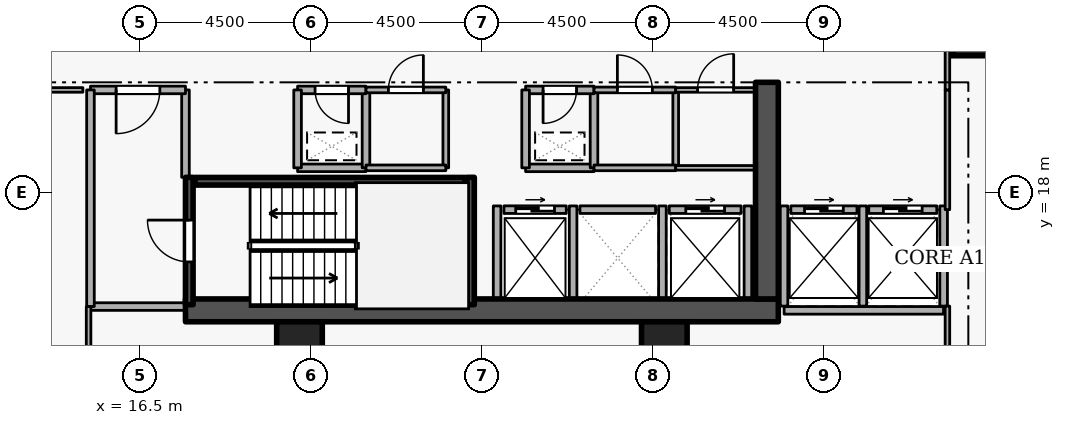
"""IFC4 building model, lengths in metres.
Left out: names, types, materials, properties, quantities, classifications, styles, units other than length and angle.
Written with IfcOpenShell. Run it as: python <this file> out.ifc"""

import sys

from ifc_helpers import new_model, si_unit, direction, frame, frame_2d, origin, origin_2d, place, context, subcontext, project, spatial, rectangle, extrude, element, fill, save


model = new_model("IFC4")
c1 = context("Model", 3, precision=1e-05, world=origin(), true_north=direction((0.0, 1.0)))
c2 = subcontext(c1, "Body", "Model", "MODEL_VIEW")
j1 = project(units=[si_unit("LENGTHUNIT", "METRE"), si_unit("PLANEANGLEUNIT", "RADIAN")], contexts=[c1])
p1 = place(None, origin())
s1 = spatial("IfcSite", under=j1, at=p1, CompositionType="ELEMENT")
p2 = place(p1, origin())
s2 = spatial("IfcBuilding", under=s1, at=p2, CompositionType="ELEMENT")
p3 = place(p2, frame((0.0, 0.0, 112.5)))
s3 = spatial("IfcBuildingStorey", under=s2, at=p3, CompositionType="ELEMENT", Elevation=112.5)
p4 = place(p3, frame((17.7, 14.9, 0.0), z_axis=(0.0, 0.0, 1.0), x_axis=(1.0, 0.0, 0.0)))
e1 = element("IfcWall", 1, at=p4, inside=s3, PredefinedType="SHEAR", context=c2, shape_type="SweptSolid", body=[
    extrude(rectangle(XDim=15.6, YDim=0.6, at=frame_2d((7.8, 0.0))), origin(), (0.0, 0.0, 1.0), 3.6),
])
p5 = place(p3, frame((33.0, 15.2, 0.0), z_axis=(0.0, 0.0, 1.0), x_axis=(0.0, 1.0, 0.0)))
e2 = element("IfcWall", 2, at=p5, inside=s3, PredefinedType="SHEAR", context=c2, shape_type="SweptSolid", body=[
    extrude(rectangle(XDim=5.7, YDim=0.6, at=frame_2d((2.85, 0.0))), origin(), (0.0, 0.0, 1.0), 3.6),
])
for number, where, z_axis, x_axis in (
    (3, (38.5, 22.2, 0.0), (0.0, 0.0, 1.0), (1.0, 0.0, 0.0)),
    (4, (20.7, 14.0, 0.0), (0.0, 0.0, 1.0), (1.0, 0.0, 0.0)),
    (5, (30.3, 14.0, 0.0), (0.0, 0.0, 1.0), (1.0, 0.0, 0.0)),
):
    element("IfcColumn", number, at=place(p3, frame(where, z_axis=z_axis, x_axis=x_axis)), inside=s3, PredefinedType="COLUMN", context=c2, shape_type="SweptSolid", body=[
        extrude(rectangle(XDim=1.2, YDim=1.2, at=origin_2d()), origin(), (0.0, 0.0, 1.0), 3.6),
    ])
p6 = place(p3, frame((26.08, 17.55, 0.0), z_axis=(0.0, 0.0, 1.0), x_axis=(1.0, 0.0, 0.0)))
e6 = element("IfcWall", 6, at=p6, inside=s3, PredefinedType="STANDARD", context=c2, shape_type="SweptSolid", body=[
    extrude(rectangle(XDim=1.64, YDim=0.2, at=frame_2d((0.82, 0.0))), origin(), (0.0, 0.0, 1.0), 3.34),
])
p7 = place(p6, frame((0.31, 0.0, 0.0)))
e7 = element("IfcOpeningElement", 7, at=p7, cuts=e6, PredefinedType="OPENING", context=c2, shape_type="SweptSolid", body=[
    extrude(rectangle(XDim=1.02, YDim=2.06, at=frame_2d((0.51, 1.03))), frame((0.0, 0.11, 0.0), z_axis=(0.0, -1.0, 0.0), x_axis=(1.0, 0.0, 0.0)), (0.0, 0.0, 1.0), 0.22),
])
p8 = place(p3, frame((28.08, 17.55, 0.0), z_axis=(0.0, 0.0, 1.0), x_axis=(1.0, 0.0, 0.0)))
e8 = element("IfcWall", 8, at=p8, inside=s3, PredefinedType="STANDARD", context=c2, shape_type="SweptSolid", body=[
    extrude(rectangle(XDim=1.99, YDim=0.2, at=frame_2d((0.995, 0.0))), origin(), (0.0, 0.0, 1.0), 3.34),
])
p9 = place(p3, frame((30.43, 17.55, 0.0), z_axis=(0.0, 0.0, 1.0), x_axis=(1.0, 0.0, 0.0)))
e9 = element("IfcWall", 9, at=p9, inside=s3, PredefinedType="STANDARD", context=c2, shape_type="SweptSolid", body=[
    extrude(rectangle(XDim=1.89, YDim=0.2, at=frame_2d((0.945, 0.0))), origin(), (0.0, 0.0, 1.0), 3.34),
])
p10 = place(p9, frame((0.435, 0.0, 0.0)))
e10 = element("IfcOpeningElement", 10, at=p10, cuts=e9, PredefinedType="OPENING", context=c2, shape_type="SweptSolid", body=[
    extrude(rectangle(XDim=1.02, YDim=2.06, at=frame_2d((0.51, 1.03))), frame((0.0, 0.11, 0.0), z_axis=(0.0, -1.0, 0.0), x_axis=(1.0, 0.0, 0.0)), (0.0, 0.0, 1.0), 0.22),
])
p11 = place(p3, frame((33.63, 17.55, 0.0), z_axis=(0.0, 0.0, 1.0), x_axis=(1.0, 0.0, 0.0)))
e11 = element("IfcWall", 11, at=p11, inside=s3, PredefinedType="STANDARD", context=c2, shape_type="SweptSolid", body=[
    extrude(rectangle(XDim=1.74, YDim=0.2, at=frame_2d((0.87, 0.0))), origin(), (0.0, 0.0, 1.0), 3.34),
])
p12 = place(p11, frame((0.36, 0.0, 0.0)))
e12 = element("IfcOpeningElement", 12, at=p12, cuts=e11, PredefinedType="OPENING", context=c2, shape_type="SweptSolid", body=[
    extrude(rectangle(XDim=1.02, YDim=2.06, at=frame_2d((0.51, 1.03))), frame((0.0, 0.11, 0.0), z_axis=(0.0, -1.0, 0.0), x_axis=(1.0, 0.0, 0.0)), (0.0, 0.0, 1.0), 0.22),
])
p13 = place(p3, frame((35.68, 17.55, 0.0), z_axis=(0.0, 0.0, 1.0), x_axis=(1.0, 0.0, 0.0)))
e13 = element("IfcWall", 13, at=p13, inside=s3, PredefinedType="STANDARD", context=c2, shape_type="SweptSolid", body=[
    extrude(rectangle(XDim=1.79, YDim=0.2, at=frame_2d((0.895, 0.0))), origin(), (0.0, 0.0, 1.0), 3.34),
])
p14 = place(p13, frame((0.385, 0.0, 0.0)))
e14 = element("IfcOpeningElement", 14, at=p14, cuts=e13, PredefinedType="OPENING", context=c2, shape_type="SweptSolid", body=[
    extrude(rectangle(XDim=1.02, YDim=2.06, at=frame_2d((0.51, 1.03))), frame((0.0, 0.11, 0.0), z_axis=(0.0, -1.0, 0.0), x_axis=(1.0, 0.0, 0.0)), (0.0, 0.0, 1.0), 0.22),
])
for number, where, z_axis, x_axis in (
    (15, (27.9, 15.212, 0.0), (0.0, 0.0, 1.0), (0.0, 1.0, 0.0)),
    (16, (25.9, 15.212, 0.0), (0.0, 0.0, 1.0), (0.0, 1.0, 0.0)),
    (17, (30.25, 15.212, 0.0), (0.0, 0.0, 1.0), (0.0, 1.0, 0.0)),
    (18, (32.5, 15.212, 0.0), (0.0, 0.0, 1.0), (0.0, 1.0, 0.0)),
):
    element("IfcWall", number, at=place(p3, frame(where, z_axis=z_axis, x_axis=x_axis)), inside=s3, PredefinedType="STANDARD", context=c2, shape_type="SweptSolid", body=[
        extrude(rectangle(XDim=2.436, YDim=0.2, at=frame_2d((1.218, 0.0))), origin(), (0.0, 0.0, 1.0), 3.34),
    ])
p15 = place(p3, frame((33.452, 14.9, 0.0), z_axis=(0.0, 0.0, 1.0), x_axis=(1.0, 0.0, 0.0)))
e19 = element("IfcWall", 19, at=p15, inside=s3, PredefinedType="STANDARD", context=c2, shape_type="SweptSolid", body=[
    extrude(rectangle(XDim=4.196, YDim=0.2, at=frame_2d((2.098, 0.0))), origin(), (0.0, 0.0, 1.0), 3.34),
])
for number, where, z_axis, x_axis in (
    (20, (35.525, 15.012, 0.0), (0.0, 0.0, 1.0), (0.0, 1.0, 0.0)),
    (21, (33.45, 15.012, 0.0), (0.0, 0.0, 1.0), (0.0, 1.0, 0.0)),
    (22, (37.65, 15.012, 0.0), (0.0, 0.0, 1.0), (0.0, 1.0, 0.0)),
):
    element("IfcWall", number, at=place(p3, frame(where, z_axis=z_axis, x_axis=x_axis)), inside=s3, PredefinedType="STANDARD", context=c2, shape_type="SweptSolid", body=[
        extrude(rectangle(XDim=2.636, YDim=0.2, at=frame_2d((1.318, 0.0))), origin(), (0.0, 0.0, 1.0), 3.34),
    ])
p16 = place(p3, frame((17.8, 15.05, 0.0), z_axis=(0.0, 0.0, 1.0), x_axis=(0.0, 1.0, 0.0)))
e23 = element("IfcWall", 23, at=p16, inside=s3, PredefinedType="SHEAR", context=c2, shape_type="SweptSolid", body=[
    extrude(rectangle(XDim=3.35, YDim=0.2, at=frame_2d((1.675, 0.0))), origin(), (0.0, 0.0, 1.0), 3.6),
])
p17 = place(p16, frame((1.125, 0.0, 0.0)))
e24 = element("IfcOpeningElement", 24, at=p17, cuts=e23, PredefinedType="OPENING", context=c2, shape_type="SweptSolid", body=[
    extrude(rectangle(XDim=1.1, YDim=2.1, at=frame_2d((0.55, 1.05))), frame((0.0, 0.11, 0.0), z_axis=(0.0, -1.0, 0.0), x_axis=(1.0, 0.0, 0.0)), (0.0, 0.0, 1.0), 0.22),
])
p18 = place(p3, frame((25.2, 18.4, 0.0), z_axis=(0.0, 0.0, 1.0), x_axis=(0.0, -1.0, 0.0)))
e25 = element("IfcWall", 25, at=p18, inside=s3, PredefinedType="SHEAR", context=c2, shape_type="SweptSolid", body=[
    extrude(rectangle(XDim=3.35, YDim=0.2, at=frame_2d((1.675, 0.0))), origin(), (0.0, 0.0, 1.0), 3.6),
])
p19 = place(p3, frame((25.05, 18.297, 0.0), z_axis=(0.0, 0.0, 1.0), x_axis=(-1.0, 0.0, 0.0)))
e26 = element("IfcWall", 26, at=p19, inside=s3, PredefinedType="SHEAR", context=c2, shape_type="SweptSolid", body=[
    extrude(rectangle(XDim=7.1, YDim=0.2, at=frame_2d((3.55, 0.0))), origin(), (0.0, 0.0, 1.0), 3.6),
])
p20 = place(p3, frame((15.2, 15.0, 0.0), z_axis=(0.0, 0.0, 1.0), x_axis=(1.0, 0.0, 0.0)))
e27 = element("IfcWall", 27, at=p20, inside=s3, PredefinedType="STANDARD", context=c2, shape_type="SweptSolid", body=[
    extrude(rectangle(XDim=2.5, YDim=0.2, at=frame_2d((1.25, 0.0))), origin(), (0.0, 0.0, 1.0), 3.34),
])
p21 = place(p3, frame((17.7, 18.4, 0.0), z_axis=(0.0, 0.0, 1.0), x_axis=(0.0, 1.0, 0.0)))
e28 = element("IfcWall", 28, at=p21, inside=s3, PredefinedType="STANDARD", context=c2, shape_type="SweptSolid", body=[
    extrude(rectangle(XDim=2.3, YDim=0.2, at=frame_2d((1.15, 0.0))), origin(), (0.0, 0.0, 1.0), 2.545),
])
p22 = place(p3, frame((17.7, 20.7, 0.0), z_axis=(0.0, 0.0, 1.0), x_axis=(-1.0, 0.0, 0.0)))
e29 = element("IfcWall", 29, at=p22, inside=s3, PredefinedType="STANDARD", context=c2, shape_type="SweptSolid", body=[
    extrude(rectangle(XDim=2.5, YDim=0.2, at=frame_2d((1.25, 0.0))), origin(), (0.0, 0.0, 1.0), 3.34),
])
p23 = place(p22, frame((0.675, 0.0, 0.0)))
e30 = element("IfcOpeningElement", 30, at=p23, cuts=e29, PredefinedType="OPENING", context=c2, shape_type="SweptSolid", body=[
    extrude(rectangle(XDim=1.15, YDim=2.1, at=frame_2d((0.575, 1.05))), frame((0.0, 0.11, 0.0), z_axis=(0.0, -1.0, 0.0), x_axis=(1.0, 0.0, 0.0)), (0.0, 0.0, 1.0), 0.22),
])
p24 = place(p3, frame((15.2, 20.7, 0.0), z_axis=(0.0, 0.0, 1.0), x_axis=(0.0, -1.0, 0.0)))
e31 = element("IfcWall", 31, at=p24, inside=s3, PredefinedType="STANDARD", context=c2, shape_type="SweptSolid", body=[
    extrude(rectangle(XDim=5.7, YDim=0.2, at=frame_2d((2.85, 0.0))), origin(), (0.0, 0.0, 1.0), 3.34),
])
p25 = place(p3, frame((26.65, 18.65, 0.0), z_axis=(0.0, 0.0, 1.0), x_axis=(1.0, 0.0, 0.0)))
e32 = element("IfcWall", 32, at=p25, inside=s3, PredefinedType="STANDARD", context=c2, shape_type="SweptSolid", body=[
    extrude(rectangle(XDim=1.8, YDim=0.2, at=frame_2d((0.9, 0.0))), origin(), (0.0, 0.0, 1.0), 3.34),
])
p26 = place(p3, frame((28.45, 18.65, 0.0), z_axis=(0.0, 0.0, 1.0), x_axis=(0.0, 1.0, 0.0)))
e33 = element("IfcWall", 33, at=p26, inside=s3, PredefinedType="STANDARD", context=c2, shape_type="SweptSolid", body=[
    extrude(rectangle(XDim=2.05, YDim=0.2, at=frame_2d((1.025, 0.0))), origin(), (0.0, 0.0, 1.0), 3.34),
])
p27 = place(p3, frame((28.45, 20.7, 0.0), z_axis=(0.0, 0.0, 1.0), x_axis=(-1.0, 0.0, 0.0)))
e34 = element("IfcWall", 34, at=p27, inside=s3, PredefinedType="STANDARD", context=c2, shape_type="SweptSolid", body=[
    extrude(rectangle(XDim=1.8, YDim=0.2, at=frame_2d((0.9, 0.0))), origin(), (0.0, 0.0, 1.0), 3.34),
])
p28 = place(p27, frame((0.46, 0.0, 0.0)))
e35 = element("IfcOpeningElement", 35, at=p28, cuts=e34, PredefinedType="OPENING", context=c2, shape_type="SweptSolid", body=[
    extrude(rectangle(XDim=0.88, YDim=2.04, at=frame_2d((0.44, 1.02))), frame((0.0, 0.11, 0.0), z_axis=(0.0, -1.0, 0.0), x_axis=(1.0, 0.0, 0.0)), (0.0, 0.0, 1.0), 0.22),
])
p29 = place(p3, frame((26.65, 20.7, 0.0), z_axis=(0.0, 0.0, 1.0), x_axis=(0.0, -1.0, 0.0)))
e36 = element("IfcWall", 36, at=p29, inside=s3, PredefinedType="STANDARD", context=c2, shape_type="SweptSolid", body=[
    extrude(rectangle(XDim=2.05, YDim=0.2, at=frame_2d((1.025, 0.0))), origin(), (0.0, 0.0, 1.0), 3.34),
])
p30 = place(p3, frame((20.65, 18.65, 0.0), z_axis=(0.0, 0.0, 1.0), x_axis=(1.0, 0.0, 0.0)))
e37 = element("IfcWall", 37, at=p30, inside=s3, PredefinedType="STANDARD", context=c2, shape_type="SweptSolid", body=[
    extrude(rectangle(XDim=1.8, YDim=0.2, at=frame_2d((0.9, 0.0))), origin(), (0.0, 0.0, 1.0), 3.34),
])
p31 = place(p3, frame((22.45, 18.65, 0.0), z_axis=(0.0, 0.0, 1.0), x_axis=(0.0, 1.0, 0.0)))
e38 = element("IfcWall", 38, at=p31, inside=s3, PredefinedType="STANDARD", context=c2, shape_type="SweptSolid", body=[
    extrude(rectangle(XDim=2.05, YDim=0.2, at=frame_2d((1.025, 0.0))), origin(), (0.0, 0.0, 1.0), 3.34),
])
p32 = place(p3, frame((22.45, 20.7, 0.0), z_axis=(0.0, 0.0, 1.0), x_axis=(-1.0, 0.0, 0.0)))
e39 = element("IfcWall", 39, at=p32, inside=s3, PredefinedType="STANDARD", context=c2, shape_type="SweptSolid", body=[
    extrude(rectangle(XDim=1.8, YDim=0.2, at=frame_2d((0.9, 0.0))), origin(), (0.0, 0.0, 1.0), 3.34),
])
p33 = place(p32, frame((0.46, 0.0, 0.0)))
e40 = element("IfcOpeningElement", 40, at=p33, cuts=e39, PredefinedType="OPENING", context=c2, shape_type="SweptSolid", body=[
    extrude(rectangle(XDim=0.88, YDim=2.04, at=frame_2d((0.44, 1.02))), frame((0.0, 0.11, 0.0), z_axis=(0.0, -1.0, 0.0), x_axis=(1.0, 0.0, 0.0)), (0.0, 0.0, 1.0), 0.22),
])
p34 = place(p3, frame((20.65, 20.7, 0.0), z_axis=(0.0, 0.0, 1.0), x_axis=(0.0, -1.0, 0.0)))
e41 = element("IfcWall", 41, at=p34, inside=s3, PredefinedType="STANDARD", context=c2, shape_type="SweptSolid", body=[
    extrude(rectangle(XDim=2.05, YDim=0.2, at=frame_2d((1.025, 0.0))), origin(), (0.0, 0.0, 1.0), 3.34),
])
p35 = place(p3, frame((24.55, 20.7, 0.0), z_axis=(0.0, 0.0, 1.0), x_axis=(0.0, -1.0, 0.0)))
e42 = element("IfcWall", 42, at=p35, inside=s3, PredefinedType="PARTITIONING", context=c2, shape_type="SweptSolid", body=[
    extrude(rectangle(XDim=2.05, YDim=0.15, at=frame_2d((1.025, 0.0))), origin(), (0.0, 0.0, 1.0), 3.34),
])
p36 = place(p3, frame((24.55, 18.65, 0.0), z_axis=(0.0, 0.0, 1.0), x_axis=(-1.0, 0.0, 0.0)))
e43 = element("IfcWall", 43, at=p36, inside=s3, PredefinedType="PARTITIONING", context=c2, shape_type="SweptSolid", body=[
    extrude(rectangle(XDim=2.1, YDim=0.15, at=frame_2d((1.05, 0.0))), origin(), (0.0, 0.0, 1.0), 3.34),
])
p37 = place(p3, frame((22.45, 20.7, 0.0), z_axis=(0.0, 0.0, 1.0), x_axis=(1.0, 0.0, 0.0)))
e44 = element("IfcWall", 44, at=p37, inside=s3, PredefinedType="PARTITIONING", context=c2, shape_type="SweptSolid", body=[
    extrude(rectangle(XDim=2.1, YDim=0.15, at=frame_2d((1.05, 0.0))), origin(), (0.0, 0.0, 1.0), 3.34),
])
p38 = place(p37, frame((0.59, 0.0, 0.0)))
e45 = element("IfcOpeningElement", 45, at=p38, cuts=e44, PredefinedType="OPENING", context=c2, shape_type="SweptSolid", body=[
    extrude(rectangle(XDim=0.92, YDim=2.08, at=frame_2d((0.46, 1.04))), frame((0.0, 0.085, 0.0), z_axis=(0.0, -1.0, 0.0), x_axis=(1.0, 0.0, 0.0)), (0.0, 0.0, 1.0), 0.17),
])
p39 = place(p3, frame((30.6, 20.7, 0.0), z_axis=(0.0, 0.0, 1.0), x_axis=(0.0, -1.0, 0.0)))
e46 = element("IfcWall", 46, at=p39, inside=s3, PredefinedType="PARTITIONING", context=c2, shape_type="SweptSolid", body=[
    extrude(rectangle(XDim=2.05, YDim=0.15, at=frame_2d((1.025, 0.0))), origin(), (0.0, 0.0, 1.0), 3.34),
])
p40 = place(p3, frame((30.6, 18.65, 0.0), z_axis=(0.0, 0.0, 1.0), x_axis=(-1.0, 0.0, 0.0)))
e47 = element("IfcWall", 47, at=p40, inside=s3, PredefinedType="PARTITIONING", context=c2, shape_type="SweptSolid", body=[
    extrude(rectangle(XDim=2.15, YDim=0.15, at=frame_2d((1.075, 0.0))), origin(), (0.0, 0.0, 1.0), 3.34),
])
p41 = place(p3, frame((28.45, 20.7, 0.0), z_axis=(0.0, 0.0, 1.0), x_axis=(1.0, 0.0, 0.0)))
e48 = element("IfcWall", 48, at=p41, inside=s3, PredefinedType="PARTITIONING", context=c2, shape_type="SweptSolid", body=[
    extrude(rectangle(XDim=2.15, YDim=0.15, at=frame_2d((1.075, 0.0))), origin(), (0.0, 0.0, 1.0), 3.34),
])
p42 = place(p41, frame((0.615, 0.0, 0.0)))
e49 = element("IfcOpeningElement", 49, at=p42, cuts=e48, PredefinedType="OPENING", context=c2, shape_type="SweptSolid", body=[
    extrude(rectangle(XDim=0.92, YDim=2.08, at=frame_2d((0.46, 1.04))), frame((0.0, 0.085, 0.0), z_axis=(0.0, -1.0, 0.0), x_axis=(1.0, 0.0, 0.0)), (0.0, 0.0, 1.0), 0.17),
])
p43 = place(p3, frame((32.7, 18.65, 0.0), z_axis=(0.0, 0.0, 1.0), x_axis=(-1.0, 0.0, 0.0)))
e50 = element("IfcWall", 50, at=p43, inside=s3, PredefinedType="PARTITIONING", context=c2, shape_type="SweptSolid", body=[
    extrude(rectangle(XDim=2.1, YDim=0.12, at=frame_2d((1.05, 0.0))), origin(), (0.0, 0.0, 1.0), 3.34),
])
p44 = place(p3, frame((30.6, 20.7, 0.0), z_axis=(0.0, 0.0, 1.0), x_axis=(1.0, 0.0, 0.0)))
e51 = element("IfcWall", 51, at=p44, inside=s3, PredefinedType="PARTITIONING", context=c2, shape_type="SweptSolid", body=[
    extrude(rectangle(XDim=2.1, YDim=0.12, at=frame_2d((1.05, 0.0))), origin(), (0.0, 0.0, 1.0), 3.34),
])
p45 = place(p44, frame((0.575, 0.0, 0.0)))
e52 = element("IfcOpeningElement", 52, at=p45, cuts=e51, PredefinedType="OPENING", context=c2, shape_type="SweptSolid", body=[
    extrude(rectangle(XDim=0.95, YDim=2.1, at=frame_2d((0.475, 1.05))), frame((0.0, 0.07, 0.0), z_axis=(0.0, -1.0, 0.0), x_axis=(1.0, 0.0, 0.0)), (0.0, 0.0, 1.0), 0.14),
])
p46 = place(p3, frame((13.25, 20.7, 0.0), z_axis=(0.0, 0.0, 1.0), x_axis=(1.0, 0.0, 0.0)))
e53 = element("IfcWall", 53, at=p46, inside=s3, PredefinedType="PARTITIONING", context=c2, shape_type="SweptSolid", body=[
    extrude(rectangle(XDim=1.75, YDim=0.12, at=frame_2d((0.875, 0.0))), origin(), (0.0, 0.0, 1.0), 3.34),
])
p47 = place(p3, frame((15.15, 15.0, 0.0), z_axis=(0.0, 0.0, 1.0), x_axis=(0.0, -1.0, 0.0)))
e54 = element("IfcWall", 54, at=p47, inside=s3, PredefinedType="PARTITIONING", context=c2, shape_type="SweptSolid", body=[
    extrude(rectangle(XDim=5.92, YDim=0.12, at=frame_2d((2.96, 0.0))), origin(), (0.0, 0.0, 1.0), 3.34),
])
p48 = place(p3, frame((37.75, 17.55, 0.0), z_axis=(0.0, 0.0, 1.0), x_axis=(0.0, 1.0, 0.0)))
e55 = element("IfcWall", 55, at=p48, inside=s3, PredefinedType="PARTITIONING", context=c2, shape_type="SweptSolid", body=[
    extrude(rectangle(XDim=3.15, YDim=0.12, at=frame_2d((1.575, 0.0))), origin(), (0.0, 0.0, 1.0), 3.34),
])
p49 = place(p3, frame((37.75, 20.7, 0.0), z_axis=(0.0, 0.0, 1.0), x_axis=(0.0, 1.0, 0.0)))
e56 = element("IfcWall", 56, at=p49, inside=s3, PredefinedType="PARTITIONING", context=c2, shape_type="SweptSolid", body=[
    extrude(rectangle(XDim=1.85, YDim=0.12, at=frame_2d((0.925, 0.0))), origin(), (0.0, 0.0, 1.0), 3.34),
])
p50 = place(p3, frame((37.75, 9.08, 0.0), z_axis=(0.0, 0.0, 1.0), x_axis=(0.0, 1.0, 0.0)))
e57 = element("IfcWall", 57, at=p50, inside=s3, PredefinedType="PARTITIONING", context=c2, shape_type="SweptSolid", body=[
    extrude(rectangle(XDim=5.932, YDim=0.12, at=frame_2d((2.966, 0.0))), origin(), (0.0, 0.0, 1.0), 3.34),
])
p51 = place(p7, origin())
e58 = element("IfcDoor", 58, at=p51, inside=s3, OperationType="SLIDING_TO_LEFT", PredefinedType="DOOR", context=c2, shape_type="SweptSolid", body=[
    extrude(rectangle(XDim=1.02, YDim=2.06, at=frame_2d((0.51, 1.03))), frame((0.0, 0.025, 0.0), z_axis=(0.0, -1.0, 0.0), x_axis=(1.0, 0.0, 0.0)), (0.0, 0.0, 1.0), 0.05),
])
fill(e7, e58)
p52 = place(p10, origin())
e59 = element("IfcDoor", 59, at=p52, inside=s3, OperationType="SLIDING_TO_LEFT", PredefinedType="DOOR", context=c2, shape_type="SweptSolid", body=[
    extrude(rectangle(XDim=1.02, YDim=2.06, at=frame_2d((0.51, 1.03))), frame((0.0, 0.025, 0.0), z_axis=(0.0, -1.0, 0.0), x_axis=(1.0, 0.0, 0.0)), (0.0, 0.0, 1.0), 0.05),
])
fill(e10, e59)
p53 = place(p12, origin())
e60 = element("IfcDoor", 60, at=p53, inside=s3, OperationType="SLIDING_TO_LEFT", PredefinedType="DOOR", context=c2, shape_type="SweptSolid", body=[
    extrude(rectangle(XDim=1.02, YDim=2.06, at=frame_2d((0.51, 1.03))), frame((0.0, 0.025, 0.0), z_axis=(0.0, -1.0, 0.0), x_axis=(1.0, 0.0, 0.0)), (0.0, 0.0, 1.0), 0.05),
])
fill(e12, e60)
p54 = place(p14, origin())
e61 = element("IfcDoor", 61, at=p54, inside=s3, OperationType="SLIDING_TO_LEFT", PredefinedType="DOOR", context=c2, shape_type="SweptSolid", body=[
    extrude(rectangle(XDim=1.02, YDim=2.06, at=frame_2d((0.51, 1.03))), frame((0.0, 0.025, 0.0), z_axis=(0.0, -1.0, 0.0), x_axis=(1.0, 0.0, 0.0)), (0.0, 0.0, 1.0), 0.05),
])
fill(e14, e61)
p55 = place(p17, origin())
e62 = element("IfcDoor", 62, at=p55, inside=s3, OperationType="SINGLE_SWING_RIGHT", PredefinedType="DOOR", context=c2, shape_type="SweptSolid", body=[
    extrude(rectangle(XDim=1.1, YDim=2.1, at=frame_2d((0.55, 1.05))), frame((0.0, 0.025, 0.0), z_axis=(0.0, -1.0, 0.0), x_axis=(1.0, 0.0, 0.0)), (0.0, 0.0, 1.0), 0.05),
])
fill(e24, e62)
p56 = place(p23, origin())
e63 = element("IfcDoor", 63, at=p56, inside=s3, OperationType="SINGLE_SWING_RIGHT", PredefinedType="DOOR", context=c2, shape_type="SweptSolid", body=[
    extrude(rectangle(XDim=1.15, YDim=2.1, at=frame_2d((0.575, 1.05))), frame((0.0, 0.025, 0.0), z_axis=(0.0, -1.0, 0.0), x_axis=(1.0, 0.0, 0.0)), (0.0, 0.0, 1.0), 0.05),
])
fill(e30, e63)
p57 = place(p28, origin())
e64 = element("IfcDoor", 64, at=p57, inside=s3, OperationType="SINGLE_SWING_RIGHT", PredefinedType="DOOR", context=c2, shape_type="SweptSolid", body=[
    extrude(rectangle(XDim=0.88, YDim=2.04, at=frame_2d((0.44, 1.02))), frame((0.0, 0.025, 0.0), z_axis=(0.0, -1.0, 0.0), x_axis=(1.0, 0.0, 0.0)), (0.0, 0.0, 1.0), 0.05),
])
fill(e35, e64)
p58 = place(p33, origin())
e65 = element("IfcDoor", 65, at=p58, inside=s3, OperationType="SINGLE_SWING_LEFT", PredefinedType="DOOR", context=c2, shape_type="SweptSolid", body=[
    extrude(rectangle(XDim=0.88, YDim=2.04, at=frame_2d((0.44, 1.02))), frame((0.0, 0.025, 0.0), z_axis=(0.0, -1.0, 0.0), x_axis=(1.0, 0.0, 0.0)), (0.0, 0.0, 1.0), 0.05),
])
fill(e40, e65)
p59 = place(p38, origin())
e66 = element("IfcDoor", 66, at=p59, inside=s3, OperationType="SINGLE_SWING_RIGHT", PredefinedType="DOOR", context=c2, shape_type="SweptSolid", body=[
    extrude(rectangle(XDim=0.92, YDim=2.08, at=frame_2d((0.46, 1.04))), frame((0.0, 0.025, 0.0), z_axis=(0.0, -1.0, 0.0), x_axis=(1.0, 0.0, 0.0)), (0.0, 0.0, 1.0), 0.05),
])
fill(e45, e66)
p60 = place(p42, origin())
e67 = element("IfcDoor", 67, at=p60, inside=s3, OperationType="SINGLE_SWING_LEFT", PredefinedType="DOOR", context=c2, shape_type="SweptSolid", body=[
    extrude(rectangle(XDim=0.92, YDim=2.08, at=frame_2d((0.46, 1.04))), frame((0.0, 0.025, 0.0), z_axis=(0.0, -1.0, 0.0), x_axis=(1.0, 0.0, 0.0)), (0.0, 0.0, 1.0), 0.05),
])
fill(e49, e67)
p61 = place(p45, origin())
e68 = element("IfcDoor", 68, at=p61, inside=s3, OperationType="SINGLE_SWING_RIGHT", PredefinedType="DOOR", context=c2, shape_type="SweptSolid", body=[
    extrude(rectangle(XDim=0.95, YDim=2.1, at=frame_2d((0.475, 1.05))), frame((0.0, 0.025, 0.0), z_axis=(0.0, -1.0, 0.0), x_axis=(1.0, 0.0, 0.0)), (0.0, 0.0, 1.0), 0.05),
])
fill(e52, e68)
save(model, sys.argv[1])
